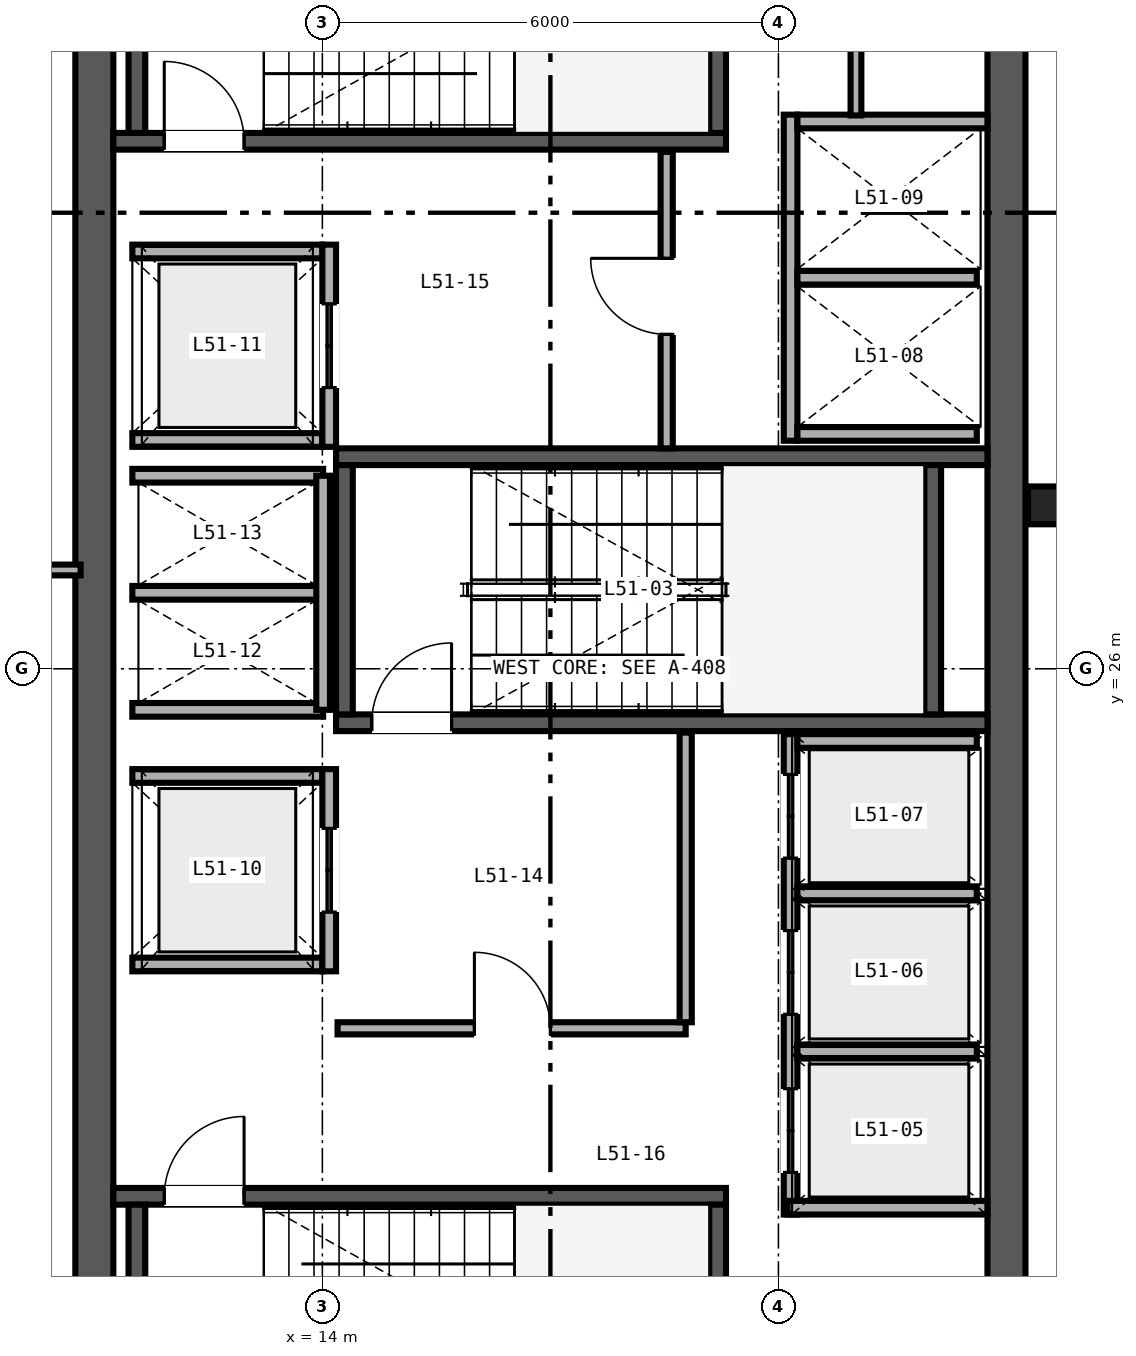
"""IFC4 building model, lengths in metres.
Left out: names, types, materials, properties, quantities, classifications, styles, units other than length and angle.
Written with IfcOpenShell. Run it as: python <this file> out.ifc"""

import sys

from ifc_helpers import new_model, si_unit, direction, frame, frame_2d, origin, origin_2d, place, context, subcontext, project, spatial, rectangle, i_section, extrude, source, transform, mapped, element, fill, save


model = new_model("IFC4")
c1 = context("Model", 3, precision=1e-05, world=origin(), true_north=direction((0.0, 1.0)))
c2 = subcontext(c1, "Body", "Model", "MODEL_VIEW")
j1 = project(units=[si_unit("LENGTHUNIT", "METRE"), si_unit("PLANEANGLEUNIT", "RADIAN")], contexts=[c1])
p1 = place(None, origin())
s1 = spatial("IfcSite", under=j1, at=p1, CompositionType="ELEMENT")
p2 = place(p1, origin())
s2 = spatial("IfcBuilding", under=s1, at=p2, CompositionType="ELEMENT")
p3 = place(p2, frame((0.0, 0.0, 202.8)))
s3 = spatial("IfcBuildingStorey", under=s2, at=p3, CompositionType="ELEMENT", Elevation=202.8)
for number, where, z_axis, x_axis in (
    (1, (11.0, 15.25, 0.0), (0.0, 0.0, 1.0), (0.0, 1.0, 0.0)),
    (2, (23.0, 15.25, 0.0), (0.0, 0.0, 1.0), (0.0, 1.0, 0.0)),
):
    element("IfcWall", number, at=place(p3, frame(where, z_axis=z_axis, x_axis=x_axis)), inside=s3, PredefinedType="SHEAR", context=c2, shape_type="SweptSolid", body=[
        extrude(rectangle(XDim=21.5, YDim=0.5, at=frame_2d((10.75, 0.0))), origin(), (0.0, 0.0, 1.0), 3.37),
    ])
p4 = place(p3, frame((11.25, 19.06, 0.0), z_axis=(0.0, 0.0, 1.0), x_axis=(1.0, 0.0, 0.0)))
e3 = element("IfcWall", 3, at=p4, inside=s3, PredefinedType="SHEAR", context=c2, shape_type="SweptSolid", body=[
    extrude(rectangle(XDim=8.06, YDim=0.22, at=frame_2d((4.03, 0.0))), origin(), (0.0, 0.0, 1.0), 3.4),
])
p5 = place(p4, frame((0.67, 0.0, 0.0)))
e4 = element("IfcOpeningElement", 4, at=p5, cuts=e3, PredefinedType="OPENING", context=c2, shape_type="SweptSolid", body=[
    extrude(rectangle(XDim=1.05, YDim=2.15, at=frame_2d((0.525, 1.075))), frame((0.0, 0.12, 0.0), z_axis=(0.0, -1.0, 0.0), x_axis=(1.0, 0.0, 0.0)), (0.0, 0.0, 1.0), 0.24),
])
for number, where, z_axis, x_axis in (
    (5, (11.56, 15.67, 0.0), (0.0, 0.0, 1.0), (0.0, 1.0, 0.0)),
    (6, (19.2, 15.67, 0.0), (0.0, 0.0, 1.0), (0.0, 1.0, 0.0)),
):
    element("IfcWall", number, at=place(p3, frame(where, z_axis=z_axis, x_axis=x_axis)), inside=s3, PredefinedType="SHEAR", context=c2, shape_type="SweptSolid", body=[
        extrude(rectangle(XDim=3.28, YDim=0.22, at=frame_2d((1.64, 0.0))), origin(), (0.0, 0.0, 1.0), 3.4),
    ])
p6 = place(p3, frame((11.25, 32.94, 0.0), z_axis=(0.0, 0.0, 1.0), x_axis=(1.0, 0.0, 0.0)))
e7 = element("IfcWall", 7, at=p6, inside=s3, PredefinedType="SHEAR", context=c2, shape_type="SweptSolid", body=[
    extrude(rectangle(XDim=8.06, YDim=0.22, at=frame_2d((4.03, 0.0))), origin(), (0.0, 0.0, 1.0), 3.4),
])
p7 = place(p6, frame((0.67, 0.0, 0.0)))
e8 = element("IfcOpeningElement", 8, at=p7, cuts=e7, PredefinedType="OPENING", context=c2, shape_type="SweptSolid", body=[
    extrude(rectangle(XDim=1.05, YDim=2.15, at=frame_2d((0.525, 1.075))), frame((0.0, 0.12, 0.0), z_axis=(0.0, -1.0, 0.0), x_axis=(1.0, 0.0, 0.0)), (0.0, 0.0, 1.0), 0.24),
])
for number, where, z_axis, x_axis in (
    (9, (11.56, 33.05, 0.0), (0.0, 0.0, 1.0), (0.0, 1.0, 0.0)),
    (10, (19.2, 33.05, 0.0), (0.0, 0.0, 1.0), (0.0, 1.0, 0.0)),
):
    element("IfcWall", number, at=place(p3, frame(where, z_axis=z_axis, x_axis=x_axis)), inside=s3, PredefinedType="SHEAR", context=c2, shape_type="SweptSolid", body=[
        extrude(rectangle(XDim=3.28, YDim=0.22, at=frame_2d((1.64, 0.0))), origin(), (0.0, 0.0, 1.0), 3.4),
    ])
p8 = place(p3, frame((14.18, 25.29, 0.0), z_axis=(0.0, 0.0, 1.0), x_axis=(1.0, 0.0, 0.0)))
e11 = element("IfcWall", 11, at=p8, inside=s3, PredefinedType="SHEAR", context=c2, shape_type="SweptSolid", body=[
    extrude(rectangle(XDim=8.57, YDim=0.22, at=frame_2d((4.285, 0.0))), origin(), (0.0, 0.0, 1.0), 3.4),
])
p9 = place(p8, frame((0.47, 0.0, 0.0)))
e12 = element("IfcOpeningElement", 12, at=p9, cuts=e11, PredefinedType="OPENING", context=c2, shape_type="SweptSolid", body=[
    extrude(rectangle(XDim=1.05, YDim=2.15, at=frame_2d((0.525, 1.075))), frame((0.0, 0.12, 0.0), z_axis=(0.0, -1.0, 0.0), x_axis=(1.0, 0.0, 0.0)), (0.0, 0.0, 1.0), 0.24),
])
p10 = place(p3, frame((14.18, 28.79, 0.0), z_axis=(0.0, 0.0, 1.0), x_axis=(1.0, 0.0, 0.0)))
e13 = element("IfcWall", 13, at=p10, inside=s3, PredefinedType="SHEAR", context=c2, shape_type="SweptSolid", body=[
    extrude(rectangle(XDim=8.57, YDim=0.22, at=frame_2d((4.285, 0.0))), origin(), (0.0, 0.0, 1.0), 3.4),
])
for number, where, z_axis, x_axis in (
    (14, (14.29, 25.4, 0.0), (0.0, 0.0, 1.0), (0.0, 1.0, 0.0)),
    (15, (22.03, 25.4, 0.0), (0.0, 0.0, 1.0), (0.0, 1.0, 0.0)),
):
    element("IfcWall", number, at=place(p3, frame(where, z_axis=z_axis, x_axis=x_axis)), inside=s3, PredefinedType="SHEAR", context=c2, shape_type="SweptSolid", body=[
        extrude(rectangle(XDim=3.28, YDim=0.22, at=frame_2d((1.64, 0.0))), origin(), (0.0, 0.0, 1.0), 3.4),
    ])
m1 = source(origin(), c2, "Body", "SweptSolid", [
    extrude(i_section(OverallWidth=0.432, OverallDepth=0.498, WebThickness=0.056, FlangeThickness=0.089, FilletRadius=0.025, at=origin_2d()), origin(), (0.0, 0.0, 1.0), 3.37),
])
p11 = place(p3, frame((23.5, 28.15, 0.0), z_axis=(0.0, 0.0, 1.0), x_axis=(1.0, 0.0, 0.0)))
e16 = element("IfcColumn", 16, at=p11, inside=s3, PredefinedType="COLUMN", context=c2, shape_type="MappedRepresentation", body=[
    mapped(m1, transform((0.0, 0.0, 0.0), scale=1.0)),
])
p12 = place(p3, frame((20.16, 18.82, 0.0), z_axis=(0.0, 0.0, 1.0), x_axis=(0.0, 1.0, 0.0)))
e17 = element("IfcWall", 17, at=p12, inside=s3, PredefinedType="SOLIDWALL", context=c2, shape_type="SweptSolid", body=[
    extrude(rectangle(XDim=6.32, YDim=0.18, at=frame_2d((3.16, 0.0))), origin(), (0.0, 0.0, 1.0), 2.47),
])
p13 = place(p12, frame((0.555, 0.0, 0.0)))
e18 = element("IfcOpeningElement", 18, at=p13, cuts=e17, PredefinedType="OPENING", context=c2, shape_type="SweptSolid", body=[
    extrude(rectangle(XDim=1.1, YDim=2.2, at=frame_2d((0.55, 1.1))), frame((0.0, 0.1, 0.0), z_axis=(0.0, -1.0, 0.0), x_axis=(1.0, 0.0, 0.0)), (0.0, 0.0, 1.0), 0.2),
])
p14 = place(p12, frame((2.635, 0.0, 0.0)))
e19 = element("IfcOpeningElement", 19, at=p14, cuts=e17, PredefinedType="OPENING", context=c2, shape_type="SweptSolid", body=[
    extrude(rectangle(XDim=1.1, YDim=2.2, at=frame_2d((0.55, 1.1))), frame((0.0, 0.1, 0.0), z_axis=(0.0, -1.0, 0.0), x_axis=(1.0, 0.0, 0.0)), (0.0, 0.0, 1.0), 0.2),
])
p15 = place(p12, frame((4.69, 0.0, 0.0)))
e20 = element("IfcOpeningElement", 20, at=p15, cuts=e17, PredefinedType="OPENING", context=c2, shape_type="SweptSolid", body=[
    extrude(rectangle(XDim=1.1, YDim=2.2, at=frame_2d((0.55, 1.1))), frame((0.0, 0.1, 0.0), z_axis=(0.0, -1.0, 0.0), x_axis=(1.0, 0.0, 0.0)), (0.0, 0.0, 1.0), 0.2),
])
p16 = place(p3, frame((20.12, 18.91, 0.0), z_axis=(0.0, 0.0, 1.0), x_axis=(1.0, 0.0, 0.0)))
e21 = element("IfcWall", 21, at=p16, inside=s3, PredefinedType="SOLIDWALL", context=c2, shape_type="SweptSolid", body=[
    extrude(rectangle(XDim=2.63, YDim=0.18, at=frame_2d((1.315, 0.0))), origin(), (0.0, 0.0, 1.0), 3.37),
])
p17 = place(p3, frame((20.25, 25.05, 0.0), z_axis=(0.0, 0.0, 1.0), x_axis=(1.0, 0.0, 0.0)))
e22 = element("IfcWall", 22, at=p17, inside=s3, PredefinedType="SOLIDWALL", context=c2, shape_type="SweptSolid", body=[
    extrude(rectangle(XDim=2.36, YDim=0.18, at=frame_2d((1.18, 0.0))), origin(), (0.0, 0.0, 1.0), 3.37),
])
p18 = place(p3, frame((20.25, 20.965, 0.0), z_axis=(0.0, 0.0, 1.0), x_axis=(1.0, 0.0, 0.0)))
e23 = element("IfcWall", 23, at=p18, inside=s3, PredefinedType="SOLIDWALL", context=c2, shape_type="SweptSolid", body=[
    extrude(rectangle(XDim=2.36, YDim=0.18, at=frame_2d((1.18, 0.0))), origin(), (0.0, 0.0, 1.0), 2.47),
])
p19 = place(p3, frame((20.25, 23.045, 0.0), z_axis=(0.0, 0.0, 1.0), x_axis=(1.0, 0.0, 0.0)))
e24 = element("IfcWall", 24, at=p19, inside=s3, PredefinedType="SOLIDWALL", context=c2, shape_type="SweptSolid", body=[
    extrude(rectangle(XDim=2.36, YDim=0.18, at=frame_2d((1.18, 0.0))), origin(), (0.0, 0.0, 1.0), 3.37),
])
p20 = place(p3, frame((20.16, 29.0, 0.0), z_axis=(0.0, 0.0, 1.0), x_axis=(0.0, 1.0, 0.0)))
e25 = element("IfcWall", 25, at=p20, inside=s3, PredefinedType="SOLIDWALL", context=c2, shape_type="SweptSolid", body=[
    extrude(rectangle(XDim=4.29, YDim=0.18, at=frame_2d((2.145, 0.0))), origin(), (0.0, 0.0, 1.0), 3.37),
])
p21 = place(p3, frame((20.25, 29.09, 0.0), z_axis=(0.0, 0.0, 1.0), x_axis=(1.0, 0.0, 0.0)))
e26 = element("IfcWall", 26, at=p21, inside=s3, PredefinedType="SOLIDWALL", context=c2, shape_type="SweptSolid", body=[
    extrude(rectangle(XDim=2.36, YDim=0.18, at=frame_2d((1.18, 0.0))), origin(), (0.0, 0.0, 1.0), 3.37),
])
p22 = place(p3, frame((20.25, 33.2, 0.0), z_axis=(0.0, 0.0, 1.0), x_axis=(1.0, 0.0, 0.0)))
e27 = element("IfcWall", 27, at=p22, inside=s3, PredefinedType="SOLIDWALL", context=c2, shape_type="SweptSolid", body=[
    extrude(rectangle(XDim=2.5, YDim=0.18, at=frame_2d((1.25, 0.0))), origin(), (0.0, 0.0, 1.0), 3.37),
])
p23 = place(p3, frame((20.25, 31.145, 0.0), z_axis=(0.0, 0.0, 1.0), x_axis=(1.0, 0.0, 0.0)))
e28 = element("IfcWall", 28, at=p23, inside=s3, PredefinedType="SOLIDWALL", context=c2, shape_type="SweptSolid", body=[
    extrude(rectangle(XDim=2.36, YDim=0.18, at=frame_2d((1.18, 0.0))), origin(), (0.0, 0.0, 1.0), 3.37),
])
for number, where, z_axis, x_axis in (
    (29, (11.5, 22.11, 0.0), (0.0, 0.0, 1.0), (1.0, 0.0, 0.0)),
    (30, (11.5, 24.59, 0.0), (0.0, 0.0, 1.0), (1.0, 0.0, 0.0)),
):
    element("IfcWall", number, at=place(p3, frame(where, z_axis=z_axis, x_axis=x_axis)), inside=s3, PredefinedType="SOLIDWALL", context=c2, shape_type="SweptSolid", body=[
        extrude(rectangle(XDim=2.5, YDim=0.18, at=frame_2d((1.25, 0.0))), origin(), (0.0, 0.0, 1.0), 3.37),
    ])
p24 = place(p3, frame((14.09, 22.02, 0.0), z_axis=(0.0, 0.0, 1.0), x_axis=(0.0, 1.0, 0.0)))
e31 = element("IfcWall", 31, at=p24, inside=s3, PredefinedType="SOLIDWALL", context=c2, shape_type="SweptSolid", body=[
    extrude(rectangle(XDim=2.66, YDim=0.18, at=frame_2d((1.33, 0.0))), origin(), (0.0, 0.0, 1.0), 3.37),
])
p25 = place(p24, frame((0.78, 0.0, 0.0)))
e32 = element("IfcOpeningElement", 32, at=p25, cuts=e31, PredefinedType="OPENING", context=c2, shape_type="SweptSolid", body=[
    extrude(rectangle(XDim=1.1, YDim=2.2, at=frame_2d((0.55, 1.1))), frame((0.0, 0.1, 0.0), z_axis=(0.0, -1.0, 0.0), x_axis=(1.0, 0.0, 0.0)), (0.0, 0.0, 1.0), 0.2),
])
for number, where, z_axis, x_axis in (
    (33, (11.5, 29.01, 0.0), (0.0, 0.0, 1.0), (1.0, 0.0, 0.0)),
    (34, (11.5, 31.49, 0.0), (0.0, 0.0, 1.0), (1.0, 0.0, 0.0)),
):
    element("IfcWall", number, at=place(p3, frame(where, z_axis=z_axis, x_axis=x_axis)), inside=s3, PredefinedType="SOLIDWALL", context=c2, shape_type="SweptSolid", body=[
        extrude(rectangle(XDim=2.5, YDim=0.18, at=frame_2d((1.25, 0.0))), origin(), (0.0, 0.0, 1.0), 3.37),
    ])
p26 = place(p3, frame((14.09, 28.92, 0.0), z_axis=(0.0, 0.0, 1.0), x_axis=(0.0, 1.0, 0.0)))
e35 = element("IfcWall", 35, at=p26, inside=s3, PredefinedType="SOLIDWALL", context=c2, shape_type="SweptSolid", body=[
    extrude(rectangle(XDim=2.66, YDim=0.18, at=frame_2d((1.33, 0.0))), origin(), (0.0, 0.0, 1.0), 3.37),
])
p27 = place(p26, frame((0.78, 0.0, 0.0)))
e36 = element("IfcOpeningElement", 36, at=p27, cuts=e35, PredefinedType="OPENING", context=c2, shape_type="SweptSolid", body=[
    extrude(rectangle(XDim=1.1, YDim=2.2, at=frame_2d((0.55, 1.1))), frame((0.0, 0.1, 0.0), z_axis=(0.0, -1.0, 0.0), x_axis=(1.0, 0.0, 0.0)), (0.0, 0.0, 1.0), 0.2),
])
for number, where, z_axis, x_axis in (
    (37, (11.5, 25.46, 0.0), (0.0, 0.0, 1.0), (1.0, 0.0, 0.0)),
    (38, (11.5, 27.0, 0.0), (0.0, 0.0, 1.0), (1.0, 0.0, 0.0)),
    (39, (11.5, 28.54, 0.0), (0.0, 0.0, 1.0), (1.0, 0.0, 0.0)),
):
    element("IfcWall", number, at=place(p3, frame(where, z_axis=z_axis, x_axis=x_axis)), inside=s3, PredefinedType="SOLIDWALL", context=c2, shape_type="SweptSolid", body=[
        extrude(rectangle(XDim=2.51, YDim=0.18, at=frame_2d((1.255, 0.0))), origin(), (0.0, 0.0, 1.0), 3.37),
    ])
p28 = place(p3, frame((14.01, 25.46, 0.0), z_axis=(0.0, 0.0, 1.0), x_axis=(0.0, 1.0, 0.0)))
e40 = element("IfcWall", 40, at=p28, inside=s3, PredefinedType="SOLIDWALL", context=c2, shape_type="SweptSolid", body=[
    extrude(rectangle(XDim=3.08, YDim=0.18, at=frame_2d((1.54, 0.0))), origin(), (0.0, 0.0, 1.0), 3.37),
])
p29 = place(p3, frame((14.2, 21.27, 0.0), z_axis=(0.0, 0.0, 1.0), x_axis=(1.0, 0.0, 0.0)))
e41 = element("IfcWall", 41, at=p29, inside=s3, PredefinedType="PARTITIONING", context=c2, shape_type="SweptSolid", body=[
    extrude(rectangle(XDim=4.58, YDim=0.16, at=frame_2d((2.29, 0.0))), origin(), (0.0, 0.0, 1.0), 3.37),
])
p30 = place(p29, frame((1.8, 0.0, 0.0)))
e42 = element("IfcOpeningElement", 42, at=p30, cuts=e41, PredefinedType="OPENING", context=c2, shape_type="SweptSolid", body=[
    extrude(rectangle(XDim=1.0, YDim=2.15, at=frame_2d((0.5, 1.075))), frame((0.0, 0.09, 0.0), z_axis=(0.0, -1.0, 0.0), x_axis=(1.0, 0.0, 0.0)), (0.0, 0.0, 1.0), 0.18),
])
p31 = place(p3, frame((18.78, 21.35, 0.0), z_axis=(0.0, 0.0, 1.0), x_axis=(0.0, 1.0, 0.0)))
e43 = element("IfcWall", 43, at=p31, inside=s3, PredefinedType="PARTITIONING", context=c2, shape_type="SweptSolid", body=[
    extrude(rectangle(XDim=3.81, YDim=0.16, at=frame_2d((1.905, 0.0))), origin(), (0.0, 0.0, 1.0), 3.37),
])
p32 = place(p3, frame((18.53, 28.9, 0.0), z_axis=(0.0, 0.0, 1.0), x_axis=(0.0, 1.0, 0.0)))
e44 = element("IfcWall", 44, at=p32, inside=s3, PredefinedType="PARTITIONING", context=c2, shape_type="SweptSolid", body=[
    extrude(rectangle(XDim=3.9, YDim=0.16, at=frame_2d((1.95, 0.0))), origin(), (0.0, 0.0, 1.0), 3.37),
])
p33 = place(p32, frame((1.5, 0.0, 0.0)))
e45 = element("IfcOpeningElement", 45, at=p33, cuts=e44, PredefinedType="OPENING", context=c2, shape_type="SweptSolid", body=[
    extrude(rectangle(XDim=1.0, YDim=2.15, at=frame_2d((0.5, 1.075))), frame((0.0, 0.09, 0.0), z_axis=(0.0, -1.0, 0.0), x_axis=(1.0, 0.0, 0.0)), (0.0, 0.0, 1.0), 0.18),
])
p34 = place(p3, frame((21.02, 33.28, 0.0), z_axis=(0.0, 0.0, 1.0), x_axis=(0.0, 1.0, 0.0)))
e46 = element("IfcWall", 46, at=p34, inside=s3, PredefinedType="PARTITIONING", context=c2, shape_type="SweptSolid", body=[
    extrude(rectangle(XDim=3.47, YDim=0.142, at=frame_2d((1.735, 0.0))), origin(), (0.0, 0.0, 1.0), 3.37),
])
p35 = place(p34, frame((1.15, 0.0, 0.0)))
e47 = element("IfcOpeningElement", 47, at=p35, cuts=e46, PredefinedType="OPENING", context=c2, shape_type="SweptSolid", body=[
    extrude(rectangle(XDim=0.84, YDim=2.1, at=frame_2d((0.42, 1.05))), frame((0.0, 0.081, 0.0), z_axis=(0.0, -1.0, 0.0), x_axis=(1.0, 0.0, 0.0)), (0.0, 0.0, 1.0), 0.162),
])
p36 = place(p3, frame((8.16, 27.3, 0.0), z_axis=(0.0, 0.0, 1.0), x_axis=(1.0, 0.0, 0.0)))
e48 = element("IfcWall", 48, at=p36, inside=s3, PredefinedType="PARTITIONING", context=c2, shape_type="SweptSolid", body=[
    extrude(rectangle(XDim=2.66, YDim=0.142, at=frame_2d((1.33, 0.0))), origin(), (0.0, 0.0, 1.0), 2.591),
])
m2 = source(origin(), c2, "Body", "SweptSolid", [
    extrude(rectangle(XDim=1.05, YDim=2.15, at=frame_2d((0.525, 1.075))), frame((0.0, 0.025, 0.0), z_axis=(0.0, -1.0, 0.0), x_axis=(1.0, 0.0, 0.0)), (0.0, 0.0, 1.0), 0.05),
])
p37 = place(p5, origin())
e49 = element("IfcDoor", 49, at=p37, inside=s3, OperationType="SINGLE_SWING_RIGHT", PredefinedType="DOOR", context=c2, shape_type="MappedRepresentation", body=[
    mapped(m2, transform((0.0, 0.0, 0.0), scale=1.0)),
])
fill(e4, e49)
p38 = place(p7, origin())
e50 = element("IfcDoor", 50, at=p38, inside=s3, OperationType="SINGLE_SWING_LEFT", PredefinedType="DOOR", context=c2, shape_type="MappedRepresentation", body=[
    mapped(m2, transform((0.0, 0.0, 0.0), scale=1.0)),
])
fill(e8, e50)
p39 = place(p9, origin())
e51 = element("IfcDoor", 51, at=p39, inside=s3, OperationType="SINGLE_SWING_RIGHT", PredefinedType="DOOR", context=c2, shape_type="MappedRepresentation", body=[
    mapped(m2, transform((0.0, 0.0, 0.0), scale=1.0)),
])
fill(e12, e51)
m3 = source(origin(), c2, "Body", "SweptSolid", [
    extrude(rectangle(XDim=1.1, YDim=2.2, at=frame_2d((0.55, 1.1))), frame((0.0, 0.025, 0.0), z_axis=(0.0, -1.0, 0.0), x_axis=(1.0, 0.0, 0.0)), (0.0, 0.0, 1.0), 0.05),
])
p40 = place(p13, origin())
e52 = element("IfcDoor", 52, at=p40, inside=s3, OperationType="DOUBLE_DOOR_SLIDING", PredefinedType="DOOR", context=c2, shape_type="MappedRepresentation", body=[
    mapped(m3, transform((0.0, 0.0, 0.0), scale=1.0)),
])
fill(e18, e52)
p41 = place(p14, origin())
e53 = element("IfcDoor", 53, at=p41, inside=s3, OperationType="DOUBLE_DOOR_SLIDING", PredefinedType="DOOR", context=c2, shape_type="MappedRepresentation", body=[
    mapped(m3, transform((0.0, 0.0, 0.0), scale=1.0)),
])
fill(e19, e53)
p42 = place(p15, origin())
e54 = element("IfcDoor", 54, at=p42, inside=s3, OperationType="DOUBLE_DOOR_SLIDING", PredefinedType="DOOR", context=c2, shape_type="MappedRepresentation", body=[
    mapped(m3, transform((0.0, 0.0, 0.0), scale=1.0)),
])
fill(e20, e54)
p43 = place(p25, origin())
e55 = element("IfcDoor", 55, at=p43, inside=s3, OperationType="DOUBLE_DOOR_SLIDING", PredefinedType="DOOR", context=c2, shape_type="MappedRepresentation", body=[
    mapped(m3, transform((0.0, 0.0, 0.0), scale=1.0)),
])
fill(e32, e55)
p44 = place(p27, origin())
e56 = element("IfcDoor", 56, at=p44, inside=s3, OperationType="DOUBLE_DOOR_SLIDING", PredefinedType="DOOR", context=c2, shape_type="MappedRepresentation", body=[
    mapped(m3, transform((0.0, 0.0, 0.0), scale=1.0)),
])
fill(e36, e56)
m4 = source(origin(), c2, "Body", "SweptSolid", [
    extrude(rectangle(XDim=1.0, YDim=2.15, at=frame_2d((0.5, 1.075))), frame((0.0, 0.025, 0.0), z_axis=(0.0, -1.0, 0.0), x_axis=(1.0, 0.0, 0.0)), (0.0, 0.0, 1.0), 0.05),
])
p45 = place(p30, origin())
e57 = element("IfcDoor", 57, at=p45, inside=s3, OperationType="SINGLE_SWING_LEFT", PredefinedType="DOOR", context=c2, shape_type="MappedRepresentation", body=[
    mapped(m4, transform((0.0, 0.0, 0.0), scale=1.0)),
])
fill(e42, e57)
p46 = place(p33, origin())
e58 = element("IfcDoor", 58, at=p46, inside=s3, OperationType="SINGLE_SWING_RIGHT", PredefinedType="DOOR", context=c2, shape_type="MappedRepresentation", body=[
    mapped(m4, transform((0.0, 0.0, 0.0), scale=1.0)),
])
fill(e45, e58)
save(model, sys.argv[1])
